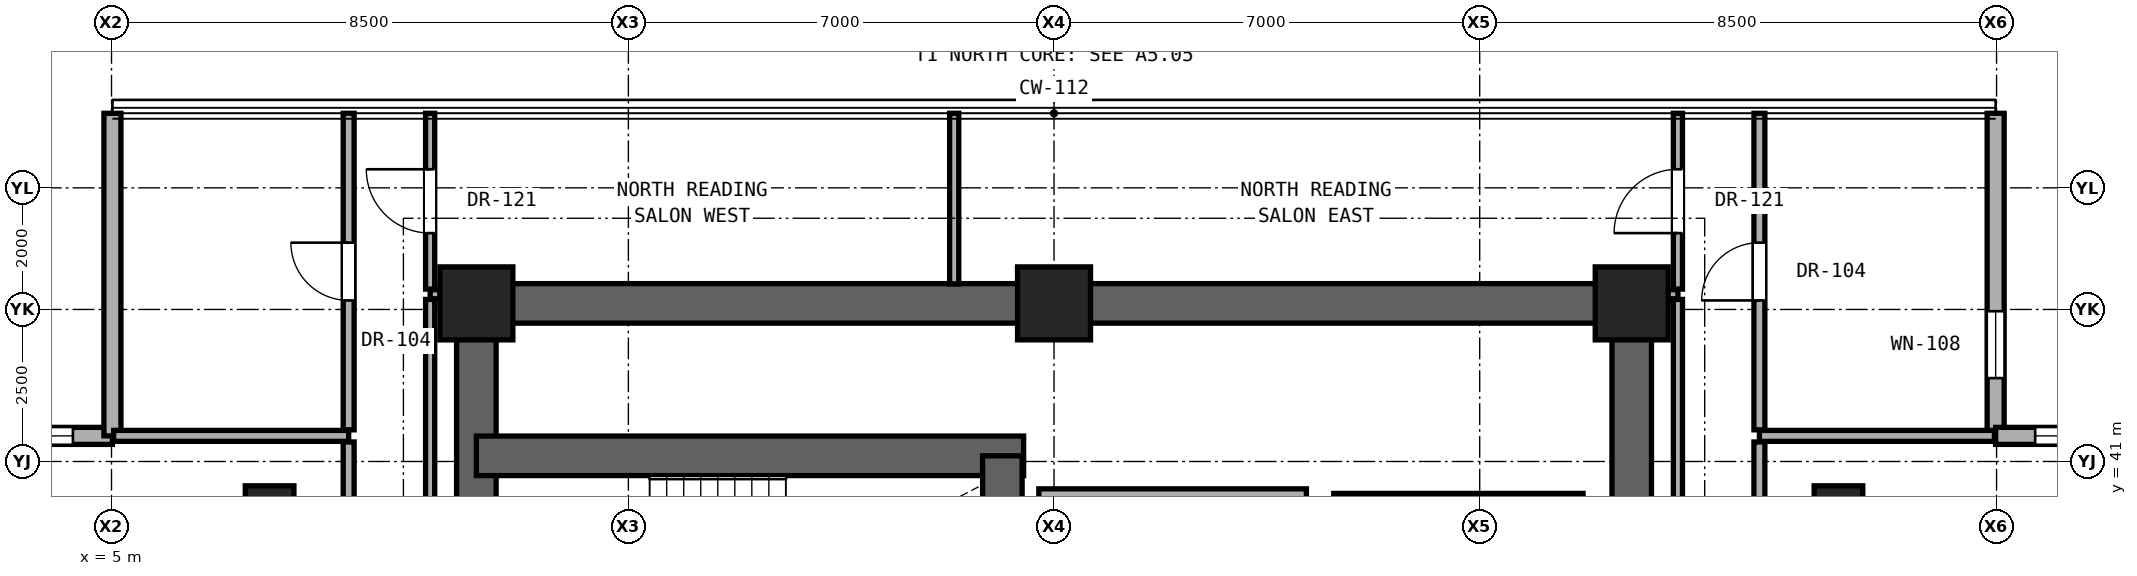
"""IFC4 building model, lengths in metres.
Left out: names, types, materials, properties, quantities, classifications, styles, units other than length and angle.
Written with IfcOpenShell. Run it as: python <this file> out.ifc"""

import sys

from ifc_helpers import new_model, si_unit, direction, frame, frame_2d, origin, origin_2d, place, context, subcontext, project, spatial, rectangle, extrude, element, fill, save


model = new_model("IFC4")
c1 = context("Model", 3, precision=1e-05, world=origin(), true_north=direction((0.0, 1.0)))
c2 = subcontext(c1, "Body", "Model", "MODEL_VIEW")
j1 = project(units=[si_unit("LENGTHUNIT", "METRE"), si_unit("PLANEANGLEUNIT", "RADIAN")], contexts=[c1])
p1 = place(None, origin())
s1 = spatial("IfcSite", under=j1, at=p1, CompositionType="ELEMENT")
p2 = place(p1, origin())
s2 = spatial("IfcBuilding", under=s1, at=p2, CompositionType="ELEMENT")
p3 = place(p2, frame((0.0, 0.0, 95.0)))
s3 = spatial("IfcBuildingStorey", under=s2, at=p3, CompositionType="ELEMENT", Elevation=95.0)
for number, where, z_axis, x_axis in (
    (1, (11.0, 43.6, 0.0), (0.0, 0.0, 1.0), (1.0, 0.0, 0.0)),
    (2, (20.5, 43.6, 0.0), (0.0, 0.0, 1.0), (1.0, 0.0, 0.0)),
    (3, (30.0, 43.6, 0.0), (0.0, 0.0, 1.0), (1.0, 0.0, 0.0)),
):
    element("IfcColumn", number, at=place(p3, frame(where, z_axis=z_axis, x_axis=x_axis)), inside=s3, PredefinedType="COLUMN", context=c2, shape_type="SweptSolid", body=[
        extrude(rectangle(XDim=1.2, YDim=1.2, at=origin_2d()), origin(), (0.0, 0.0, 1.0), 3.3),
    ])
for number, where, z_axis, x_axis in (
    (4, (7.6, 40.0, 0.0), (0.0, 0.0, 1.0), (1.0, 0.0, 0.0)),
    (5, (33.4, 40.0, 0.0), (0.0, 0.0, 1.0), (1.0, 0.0, 0.0)),
):
    element("IfcColumn", number, at=place(p3, frame(where, z_axis=z_axis, x_axis=x_axis)), inside=s3, PredefinedType="PILASTER", context=c2, shape_type="SweptSolid", body=[
        extrude(rectangle(XDim=0.8, YDim=1.2, at=origin_2d()), origin(), (0.0, 0.0, 1.0), 3.3),
    ])
p4 = place(p3, frame((11.0, 43.6, 0.0), z_axis=(0.0, 0.0, 1.0), x_axis=(1.0, 0.0, 0.0)))
e6 = element("IfcWall", 6, at=p4, inside=s3, PredefinedType="SHEAR", context=c2, shape_type="SweptSolid", body=[
    extrude(rectangle(XDim=19.0, YDim=0.65, at=frame_2d((9.5, 0.0))), origin(), (0.0, 0.0, 1.0), 3.08),
])
for number, where, z_axis, x_axis in (
    (7, (11.0, 37.6, 0.0), (0.0, 0.0, 1.0), (0.0, 1.0, 0.0)),
    (8, (30.0, 37.6, 0.0), (0.0, 0.0, 1.0), (0.0, 1.0, 0.0)),
):
    element("IfcWall", number, at=place(p3, frame(where, z_axis=z_axis, x_axis=x_axis)), inside=s3, PredefinedType="SHEAR", context=c2, shape_type="SweptSolid", body=[
        extrude(rectangle(XDim=6.0, YDim=0.65, at=frame_2d((3.0, 0.0))), origin(), (0.0, 0.0, 1.0), 3.08),
    ])
p5 = place(p3, frame((11.0, 41.093, 0.0), z_axis=(0.0, 0.0, 1.0), x_axis=(1.0, 0.0, 0.0)))
e9 = element("IfcWall", 9, at=p5, inside=s3, PredefinedType="SHEAR", context=c2, shape_type="SweptSolid", body=[
    extrude(rectangle(XDim=9.0, YDim=0.65, at=frame_2d((4.5, 0.0))), origin(), (0.0, 0.0, 1.0), 3.08),
])
p6 = place(p3, frame((19.65, 37.6, 0.0), z_axis=(0.0, 0.0, 1.0), x_axis=(0.0, 1.0, 0.0)))
e10 = element("IfcWall", 10, at=p6, inside=s3, PredefinedType="SHEAR", context=c2, shape_type="SweptSolid", body=[
    extrude(rectangle(XDim=3.493, YDim=0.65, at=frame_2d((1.747, 0.0))), origin(), (0.0, 0.0, 1.0), 3.08),
])
p7 = place(p3, frame((35.985, 41.421, 0.0), z_axis=(0.0, 0.0, 1.0), x_axis=(0.0, 1.0, 0.0)))
e11 = element("IfcWall", 11, at=p7, inside=s3, PredefinedType="SOLIDWALL", context=c2, shape_type="SweptSolid", body=[
    extrude(rectangle(XDim=5.305, YDim=0.28, at=frame_2d((2.653, 0.0))), origin(), (0.0, 0.0, 1.0), 3.06),
])
p8 = place(p7, frame((0.95, 0.0, 0.85)))
e12 = element("IfcOpeningElement", 12, at=p8, cuts=e11, PredefinedType="OPENING", context=c2, shape_type="SweptSolid", body=[
    extrude(rectangle(XDim=1.1, YDim=2.0, at=frame_2d((0.55, 1.0))), frame((0.0, 0.15, 0.0), z_axis=(0.0, -1.0, 0.0), x_axis=(1.0, 0.0, 0.0)), (0.0, 0.0, 1.0), 0.3),
])
p9 = place(p3, frame((5.015, 41.421, 0.0), z_axis=(0.0, 0.0, 1.0), x_axis=(-1.0, 0.0, 0.0)))
e13 = element("IfcWall", 13, at=p9, inside=s3, PredefinedType="SOLIDWALL", context=c2, shape_type="SweptSolid", body=[
    extrude(rectangle(XDim=5.305, YDim=0.28, at=frame_2d((2.652, 0.0))), origin(), (0.0, 0.0, 1.0), 3.06),
])
p10 = place(p9, frame((0.65, 0.0, 0.85)))
e14 = element("IfcOpeningElement", 14, at=p10, cuts=e13, PredefinedType="OPENING", context=c2, shape_type="SweptSolid", body=[
    extrude(rectangle(XDim=1.1, YDim=2.0, at=frame_2d((0.55, 1.0))), frame((0.0, 0.15, 0.0), z_axis=(0.0, -1.0, 0.0), x_axis=(1.0, 0.0, 0.0)), (0.0, 0.0, 1.0), 0.3),
])
p11 = place(p3, frame((5.015, 46.726, 0.0), z_axis=(0.0, 0.0, 1.0), x_axis=(0.0, -1.0, 0.0)))
e15 = element("IfcWall", 15, at=p11, inside=s3, PredefinedType="SOLIDWALL", context=c2, shape_type="SweptSolid", body=[
    extrude(rectangle(XDim=5.305, YDim=0.28, at=frame_2d((2.653, 0.0))), origin(), (0.0, 0.0, 1.0), 3.06),
])
p12 = place(p3, frame((41.29, 41.421, 0.0), z_axis=(0.0, 0.0, 1.0), x_axis=(-1.0, 0.0, 0.0)))
e16 = element("IfcWall", 16, at=p12, inside=s3, PredefinedType="SOLIDWALL", context=c2, shape_type="SweptSolid", body=[
    extrude(rectangle(XDim=5.305, YDim=0.28, at=frame_2d((2.652, 0.0))), origin(), (0.0, 0.0, 1.0), 3.06),
])
p13 = place(p12, frame((3.555, 0.0, 0.85)))
e17 = element("IfcOpeningElement", 17, at=p13, cuts=e16, PredefinedType="OPENING", context=c2, shape_type="SweptSolid", body=[
    extrude(rectangle(XDim=1.1, YDim=2.0, at=frame_2d((0.55, 1.0))), frame((0.0, 0.15, 0.0), z_axis=(0.0, -1.0, 0.0), x_axis=(1.0, 0.0, 0.0)), (0.0, 0.0, 1.0), 0.3),
])
p14 = place(p3, frame((25.1, 40.35, 0.0), z_axis=(0.0, 0.0, 1.0), x_axis=(1.0, 0.0, 0.0)))
e18 = element("IfcWall", 18, at=p14, inside=s3, PredefinedType="SOLIDWALL", context=c2, shape_type="SweptSolid", body=[
    extrude(rectangle(XDim=4.1, YDim=0.25, at=frame_2d((2.05, 0.0))), origin(), (0.0, 0.0, 1.0), 3.08),
])
p15 = place(p3, frame((20.25, 40.4, 0.0), z_axis=(0.0, 0.0, 1.0), x_axis=(1.0, 0.0, 0.0)))
e19 = element("IfcWall", 19, at=p15, inside=s3, PredefinedType="SOLIDWALL", context=c2, shape_type="SweptSolid", body=[
    extrude(rectangle(XDim=4.4, YDim=0.3, at=frame_2d((2.2, 0.0))), origin(), (0.0, 0.0, 1.0), 3.08),
])
for number, where, z_axis, x_axis in (
    (20, (5.035, 41.421, 0.0), (0.0, 0.0, 1.0), (1.0, 0.0, 0.0)),
    (21, (32.1, 41.421, 0.0), (0.0, 0.0, 1.0), (1.0, 0.0, 0.0)),
):
    element("IfcWall", number, at=place(p3, frame(where, z_axis=z_axis, x_axis=x_axis)), inside=s3, PredefinedType="PARTITIONING", context=c2, shape_type="SweptSolid", body=[
        extrude(rectangle(XDim=3.865, YDim=0.18, at=frame_2d((1.933, 0.0))), origin(), (0.0, 0.0, 1.0), 3.08),
    ])
for number, where, z_axis, x_axis in (
    (22, (10.24, 43.75, 0.0), (0.0, 0.0, 1.0), (1.0, 0.0, 0.0)),
    (23, (30.32, 43.75, 0.0), (0.0, 0.0, 1.0), (1.0, 0.0, 0.0)),
):
    element("IfcWall", number, at=place(p3, frame(where, z_axis=z_axis, x_axis=x_axis)), inside=s3, PredefinedType="PARTITIONING", context=c2, shape_type="SweptSolid", body=[
        extrude(rectangle(XDim=0.44, YDim=0.15, at=frame_2d((0.22, 0.0))), origin(), (0.0, 0.0, 1.0), 3.08),
    ])
p16 = place(p3, frame((8.9, 35.221, 0.0), z_axis=(0.0, 0.0, 1.0), x_axis=(0.0, 1.0, 0.0)))
e24 = element("IfcWall", 24, at=p16, inside=s3, PredefinedType="PARTITIONING", context=c2, shape_type="SweptSolid", body=[
    extrude(rectangle(XDim=6.1, YDim=0.18, at=frame_2d((3.05, 0.0))), origin(), (0.0, 0.0, 1.0), 2.456),
])
p17 = place(p16, frame((2.525, 0.0, 0.0)))
e25 = element("IfcOpeningElement", 25, at=p17, cuts=e24, PredefinedType="OPENING", context=c2, shape_type="SweptSolid", body=[
    extrude(rectangle(XDim=1.05, YDim=2.2, at=frame_2d((0.525, 1.1))), frame((0.0, 0.1, 0.0), z_axis=(0.0, -1.0, 0.0), x_axis=(1.0, 0.0, 0.0)), (0.0, 0.0, 1.0), 0.2),
])
p18 = place(p3, frame((8.9, 41.521, 0.0), z_axis=(0.0, 0.0, 1.0), x_axis=(0.0, 1.0, 0.0)))
e26 = element("IfcWall", 26, at=p18, inside=s3, PredefinedType="PARTITIONING", context=c2, shape_type="SweptSolid", body=[
    extrude(rectangle(XDim=5.205, YDim=0.18, at=frame_2d((2.603, 0.0))), origin(), (0.0, 0.0, 1.0), 3.08),
])
p19 = place(p18, frame((2.127, 0.0, 0.0)))
e27 = element("IfcOpeningElement", 27, at=p19, cuts=e26, PredefinedType="OPENING", context=c2, shape_type="SweptSolid", body=[
    extrude(rectangle(XDim=0.95, YDim=2.15, at=frame_2d((0.475, 1.075))), frame((0.0, 0.1, 0.0), z_axis=(0.0, -1.0, 0.0), x_axis=(1.0, 0.0, 0.0)), (0.0, 0.0, 1.0), 0.2),
])
p20 = place(p3, frame((10.24, 34.535, 0.0), z_axis=(0.0, 0.0, 1.0), x_axis=(0.0, 1.0, 0.0)))
e28 = element("IfcWall", 28, at=p20, inside=s3, PredefinedType="PARTITIONING", context=c2, shape_type="SweptSolid", body=[
    extrude(rectangle(XDim=9.13, YDim=0.15, at=frame_2d((4.565, 0.0))), origin(), (0.0, 0.0, 1.0), 2.456),
])
p21 = place(p3, frame((10.24, 43.835, 0.0), z_axis=(0.0, 0.0, 1.0), x_axis=(0.0, 1.0, 0.0)))
e29 = element("IfcWall", 29, at=p21, inside=s3, PredefinedType="PARTITIONING", context=c2, shape_type="SweptSolid", body=[
    extrude(rectangle(XDim=2.891, YDim=0.15, at=frame_2d((1.446, 0.0))), origin(), (0.0, 0.0, 1.0), 3.08),
])
p22 = place(p21, frame((0.92, 0.0, 0.0)))
e30 = element("IfcOpeningElement", 30, at=p22, cuts=e29, PredefinedType="OPENING", context=c2, shape_type="SweptSolid", body=[
    extrude(rectangle(XDim=1.05, YDim=2.2, at=frame_2d((0.525, 1.1))), frame((0.0, 0.085, 0.0), z_axis=(0.0, -1.0, 0.0), x_axis=(1.0, 0.0, 0.0)), (0.0, 0.0, 1.0), 0.17),
])
p23 = place(p3, frame((18.858, 43.92, 0.0), z_axis=(0.0, 0.0, 1.0), x_axis=(0.0, 1.0, 0.0)))
e31 = element("IfcWall", 31, at=p23, inside=s3, PredefinedType="PARTITIONING", context=c2, shape_type="SweptSolid", body=[
    extrude(rectangle(XDim=2.806, YDim=0.15, at=frame_2d((1.403, 0.0))), origin(), (0.0, 0.0, 1.0), 3.08),
])
p24 = place(p3, frame((30.76, 34.57, 0.0), z_axis=(0.0, 0.0, 1.0), x_axis=(0.0, 1.0, 0.0)))
e32 = element("IfcWall", 32, at=p24, inside=s3, PredefinedType="PARTITIONING", context=c2, shape_type="SweptSolid", body=[
    extrude(rectangle(XDim=9.095, YDim=0.15, at=frame_2d((4.547, 0.0))), origin(), (0.0, 0.0, 1.0), 2.456),
])
p25 = place(p3, frame((30.76, 43.835, 0.0), z_axis=(0.0, 0.0, 1.0), x_axis=(0.0, 1.0, 0.0)))
e33 = element("IfcWall", 33, at=p25, inside=s3, PredefinedType="PARTITIONING", context=c2, shape_type="SweptSolid", body=[
    extrude(rectangle(XDim=2.891, YDim=0.15, at=frame_2d((1.446, 0.0))), origin(), (0.0, 0.0, 1.0), 3.08),
])
p26 = place(p25, frame((0.92, 0.0, 0.0)))
e34 = element("IfcOpeningElement", 34, at=p26, cuts=e33, PredefinedType="OPENING", context=c2, shape_type="SweptSolid", body=[
    extrude(rectangle(XDim=1.05, YDim=2.2, at=frame_2d((0.525, 1.1))), frame((0.0, 0.085, 0.0), z_axis=(0.0, -1.0, 0.0), x_axis=(1.0, 0.0, 0.0)), (0.0, 0.0, 1.0), 0.17),
])
p27 = place(p3, frame((32.1, 33.6, 0.0), z_axis=(0.0, 0.0, 1.0), x_axis=(0.0, 1.0, 0.0)))
e35 = element("IfcWall", 35, at=p27, inside=s3, PredefinedType="PARTITIONING", context=c2, shape_type="SweptSolid", body=[
    extrude(rectangle(XDim=7.721, YDim=0.18, at=frame_2d((3.86, 0.0))), origin(), (0.0, 0.0, 1.0), 2.456),
])
p28 = place(p27, frame((3.335, 0.0, 0.0)))
e36 = element("IfcOpeningElement", 36, at=p28, cuts=e35, PredefinedType="OPENING", context=c2, shape_type="SweptSolid", body=[
    extrude(rectangle(XDim=1.05, YDim=2.2, at=frame_2d((0.525, 1.1))), frame((0.0, 0.1, 0.0), z_axis=(0.0, -1.0, 0.0), x_axis=(1.0, 0.0, 0.0)), (0.0, 0.0, 1.0), 0.2),
])
p29 = place(p3, frame((32.1, 41.521, 0.0), z_axis=(0.0, 0.0, 1.0), x_axis=(0.0, 1.0, 0.0)))
e37 = element("IfcWall", 37, at=p29, inside=s3, PredefinedType="PARTITIONING", context=c2, shape_type="SweptSolid", body=[
    extrude(rectangle(XDim=5.205, YDim=0.18, at=frame_2d((2.603, 0.0))), origin(), (0.0, 0.0, 1.0), 3.08),
])
p30 = place(p29, frame((2.127, 0.0, 0.0)))
e38 = element("IfcOpeningElement", 38, at=p30, cuts=e37, PredefinedType="OPENING", context=c2, shape_type="SweptSolid", body=[
    extrude(rectangle(XDim=0.95, YDim=2.15, at=frame_2d((0.475, 1.075))), frame((0.0, 0.1, 0.0), z_axis=(0.0, -1.0, 0.0), x_axis=(1.0, 0.0, 0.0)), (0.0, 0.0, 1.0), 0.2),
])
p31 = place(p8, origin())
e39 = element("IfcWindow", 39, at=p31, inside=s3, PartitioningType="SINGLE_PANEL", PredefinedType="WINDOW", context=c2, shape_type="SweptSolid", body=[
    extrude(rectangle(XDim=1.1, YDim=2.0, at=frame_2d((0.55, 1.0))), frame((0.0, 0.03, 0.0), z_axis=(0.0, -1.0, 0.0), x_axis=(1.0, 0.0, 0.0)), (0.0, 0.0, 1.0), 0.06),
])
fill(e12, e39)
p32 = place(p10, origin())
e40 = element("IfcWindow", 40, at=p32, inside=s3, PartitioningType="SINGLE_PANEL", PredefinedType="WINDOW", context=c2, shape_type="SweptSolid", body=[
    extrude(rectangle(XDim=1.1, YDim=2.0, at=frame_2d((0.55, 1.0))), frame((0.0, 0.03, 0.0), z_axis=(0.0, -1.0, 0.0), x_axis=(1.0, 0.0, 0.0)), (0.0, 0.0, 1.0), 0.06),
])
fill(e14, e40)
p33 = place(p13, origin())
e41 = element("IfcWindow", 41, at=p33, inside=s3, PartitioningType="SINGLE_PANEL", PredefinedType="WINDOW", context=c2, shape_type="SweptSolid", body=[
    extrude(rectangle(XDim=1.1, YDim=2.0, at=frame_2d((0.55, 1.0))), frame((0.0, 0.03, 0.0), z_axis=(0.0, -1.0, 0.0), x_axis=(1.0, 0.0, 0.0)), (0.0, 0.0, 1.0), 0.06),
])
fill(e17, e41)
p34 = place(p22, origin())
e42 = element("IfcDoor", 42, at=p34, inside=s3, OperationType="SINGLE_SWING_RIGHT", PredefinedType="DOOR", context=c2, shape_type="SweptSolid", body=[
    extrude(rectangle(XDim=1.05, YDim=2.2, at=frame_2d((0.525, 1.1))), frame((0.0, 0.025, 0.0), z_axis=(0.0, -1.0, 0.0), x_axis=(1.0, 0.0, 0.0)), (0.0, 0.0, 1.0), 0.05),
])
fill(e30, e42)
p35 = place(p26, origin())
e43 = element("IfcDoor", 43, at=p35, inside=s3, OperationType="SINGLE_SWING_LEFT", PredefinedType="DOOR", context=c2, shape_type="SweptSolid", body=[
    extrude(rectangle(XDim=1.05, YDim=2.2, at=frame_2d((0.525, 1.1))), frame((0.0, 0.025, 0.0), z_axis=(0.0, -1.0, 0.0), x_axis=(1.0, 0.0, 0.0)), (0.0, 0.0, 1.0), 0.05),
])
fill(e34, e43)
p36 = place(p19, origin())
e44 = element("IfcDoor", 44, at=p36, inside=s3, OperationType="SINGLE_SWING_RIGHT", PredefinedType="DOOR", context=c2, shape_type="SweptSolid", body=[
    extrude(rectangle(XDim=0.95, YDim=2.15, at=frame_2d((0.475, 1.075))), frame((0.0, 0.025, 0.0), z_axis=(0.0, -1.0, 0.0), x_axis=(1.0, 0.0, 0.0)), (0.0, 0.0, 1.0), 0.05),
])
fill(e27, e44)
p37 = place(p30, origin())
e45 = element("IfcDoor", 45, at=p37, inside=s3, OperationType="SINGLE_SWING_LEFT", PredefinedType="DOOR", context=c2, shape_type="SweptSolid", body=[
    extrude(rectangle(XDim=0.95, YDim=2.15, at=frame_2d((0.475, 1.075))), frame((0.0, 0.025, 0.0), z_axis=(0.0, -1.0, 0.0), x_axis=(1.0, 0.0, 0.0)), (0.0, 0.0, 1.0), 0.05),
])
fill(e38, e45)
save(model, sys.argv[1])
